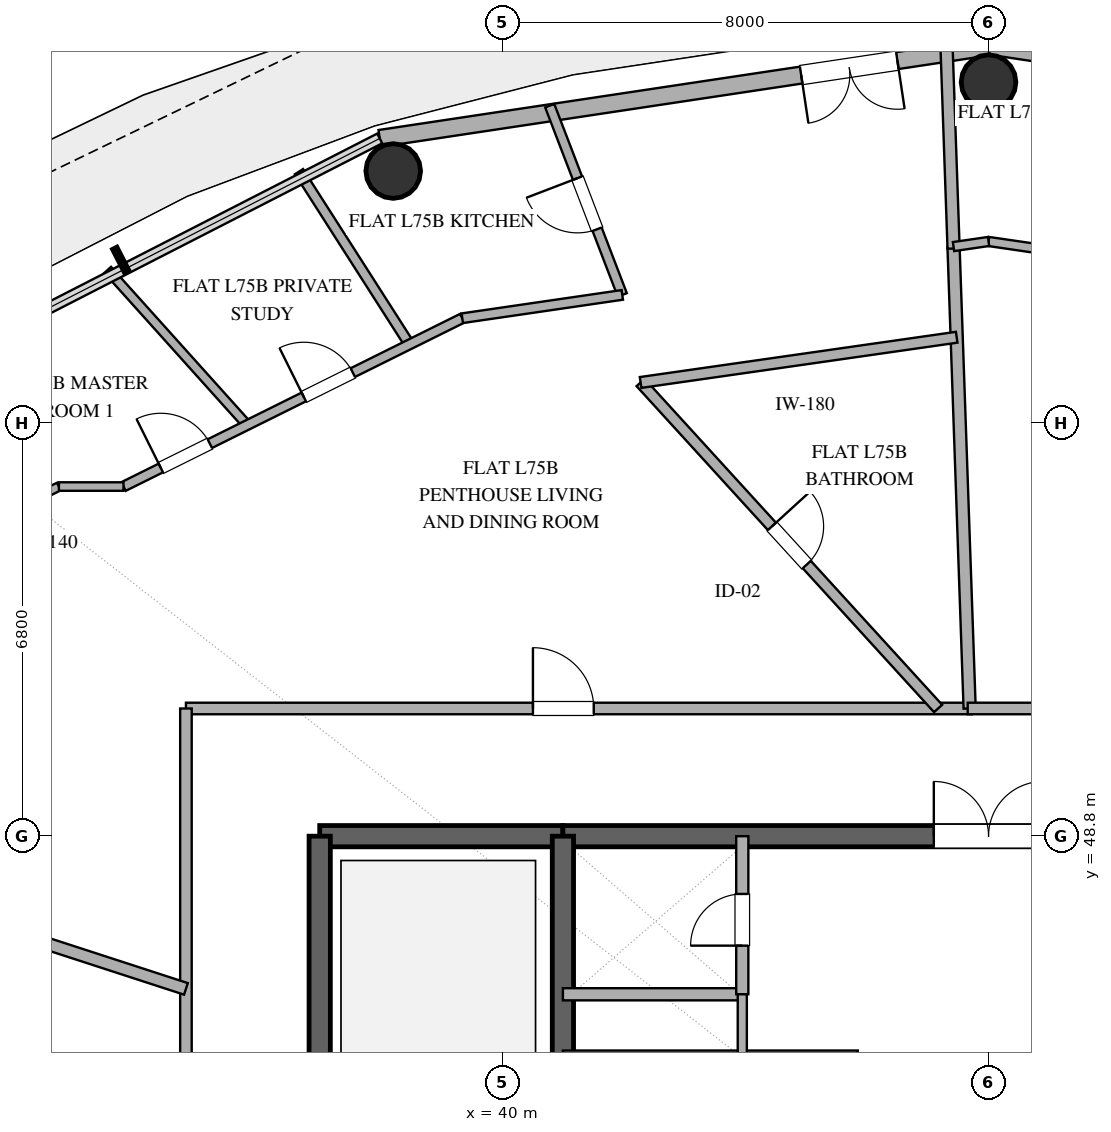
"""IFC4 building model, lengths in metres.
Left out: names, types, materials, properties, quantities, classifications, styles, units other than length and angle.
Written with IfcOpenShell. Run it as: python <this file> out.ifc"""

import sys

from ifc_helpers import new_model, si_unit, direction, frame, frame_2d, origin, origin_2d, place, context, subcontext, project, spatial, rectangle, hollow_circle, extrude, element, fill, save


model = new_model("IFC4")
c1 = context("Model", 3, precision=1e-05, world=origin(), true_north=direction((0.0, 1.0)))
c2 = subcontext(c1, "Body", "Model", "MODEL_VIEW")
j1 = project(units=[si_unit("LENGTHUNIT", "METRE"), si_unit("PLANEANGLEUNIT", "RADIAN")], contexts=[c1])
p1 = place(None, origin())
s1 = spatial("IfcSite", under=j1, at=p1, CompositionType="ELEMENT")
p2 = place(p1, origin())
s2 = spatial("IfcBuilding", under=s1, at=p2, CompositionType="ELEMENT")
p3 = place(p2, frame((0.0, 0.0, 291.0)))
s3 = spatial("IfcBuildingStorey", under=s2, at=p3, CompositionType="ELEMENT", Elevation=291.0)
p4 = place(p3, frame((37.0, 48.8, 0.0), z_axis=(0.0, 0.0, 1.0), x_axis=(1.0, 0.0, 0.0)))
e1 = element("IfcWall", 1, at=p4, inside=s3, PredefinedType="SHEAR", context=c2, shape_type="SweptSolid", body=[
    extrude(rectangle(XDim=4.0, YDim=0.35, at=frame_2d((2.0, 0.0))), origin(), (0.0, 0.0, 1.0), 3.37),
])
p5 = place(p3, frame((41.0, 48.8, 0.0), z_axis=(0.0, 0.0, 1.0), x_axis=(1.0, 0.0, 0.0)))
e2 = element("IfcWall", 2, at=p5, inside=s3, PredefinedType="SHEAR", context=c2, shape_type="SweptSolid", body=[
    extrude(rectangle(XDim=14.0, YDim=0.35, at=frame_2d((7.0, 0.0))), origin(), (0.0, 0.0, 1.0), 3.37),
])
p6 = place(p5, frame((6.1, 0.0, 0.0)))
e3 = element("IfcOpeningElement", 3, at=p6, cuts=e2, PredefinedType="OPENING", context=c2, shape_type="SweptSolid", body=[
    extrude(rectangle(XDim=1.8, YDim=2.25, at=frame_2d((0.9, 1.125))), frame((0.0, 0.185, 0.0), z_axis=(0.0, -1.0, 0.0), x_axis=(1.0, 0.0, 0.0)), (0.0, 0.0, 1.0), 0.37),
])
p7 = place(p3, frame((37.0, 35.2, 0.0), z_axis=(0.0, 0.0, 1.0), x_axis=(0.0, 1.0, 0.0)))
e4 = element("IfcWall", 4, at=p7, inside=s3, PredefinedType="SHEAR", context=c2, shape_type="SweptSolid", body=[
    extrude(rectangle(XDim=13.6, YDim=0.35, at=frame_2d((6.8, 0.0))), origin(), (0.0, 0.0, 1.0), 3.37),
])
p8 = place(p7, frame((1.5, 0.0, 0.0)))
e5 = element("IfcOpeningElement", 5, at=p8, cuts=e4, PredefinedType="OPENING", context=c2, shape_type="SweptSolid", body=[
    extrude(rectangle(XDim=1.2, YDim=2.15, at=frame_2d((0.6, 1.075))), frame((0.0, 0.185, 0.0), z_axis=(0.0, -1.0, 0.0), x_axis=(1.0, 0.0, 0.0)), (0.0, 0.0, 1.0), 0.37),
])
p9 = place(p3, frame((41.0, 35.2, 0.0), z_axis=(0.0, 0.0, 1.0), x_axis=(0.0, 1.0, 0.0)))
e6 = element("IfcWall", 6, at=p9, inside=s3, PredefinedType="SHEAR", context=c2, shape_type="SweptSolid", body=[
    extrude(rectangle(XDim=13.6, YDim=0.35, at=frame_2d((6.8, 0.0))), origin(), (0.0, 0.0, 1.0), 3.37),
])
p10 = place(p9, frame((1.15, 0.0, 0.0)))
e7 = element("IfcOpeningElement", 7, at=p10, cuts=e6, PredefinedType="OPENING", context=c2, shape_type="SweptSolid", body=[
    extrude(rectangle(XDim=1.1, YDim=2.2, at=frame_2d((0.55, 1.1))), frame((0.0, 0.185, 0.0), z_axis=(0.0, -1.0, 0.0), x_axis=(1.0, 0.0, 0.0)), (0.0, 0.0, 1.0), 0.37),
])
for number, where, z_axis, x_axis in (
    (8, (48.0, 61.2, 0.0), (0.0, 0.0, 1.0), (1.0, 0.0, 0.0)),
    (9, (38.209, 59.739, 0.0), (0.0, 0.0, 1.0), (1.0, 0.0, 0.0)),
):
    element("IfcColumn", number, at=place(p3, frame(where, z_axis=z_axis, x_axis=x_axis)), inside=s3, PredefinedType="COLUMN", context=c2, shape_type="SweptSolid", body=[
        extrude(hollow_circle(Radius=0.45, WallThickness=0.025, at=origin_2d()), origin(), (0.0, 0.0, 1.0), 3.37),
    ])
p11 = place(p3, frame((58.013, 60.274, 0.0), z_axis=(0.0, 0.0, 1.0), x_axis=(-0.988882522213, 0.148698881169, 0.0)))
e10 = element("IfcWall", 10, at=p11, inside=s3, PredefinedType="SOLIDWALL", context=c2, shape_type="SweptSolid", body=[
    extrude(rectangle(XDim=10.125, YDim=0.25, at=frame_2d((5.062, 0.0))), origin(), (0.0, 0.0, 1.0), 3.37),
])
p12 = place(p11, frame((2.134, 0.0, 0.35)))
e11 = element("IfcOpeningElement", 11, at=p12, cuts=e10, PredefinedType="OPENING", context=c2, shape_type="SweptSolid", body=[
    extrude(rectangle(XDim=1.0, YDim=1.05, at=frame_2d((0.5, 0.525))), frame((0.0, 0.135, 0.0), z_axis=(0.0, -1.0, 0.0), x_axis=(1.0, 0.0, 0.0)), (0.0, 0.0, 1.0), 0.27),
])
p13 = place(p11, frame((6.582, 0.0, 1.42)))
e12 = element("IfcOpeningElement", 12, at=p13, cuts=e10, PredefinedType="OPENING", context=c2, shape_type="SweptSolid", body=[
    extrude(rectangle(XDim=1.0, YDim=1.05, at=frame_2d((0.5, 0.525))), frame((0.0, 0.135, 0.0), z_axis=(0.0, -1.0, 0.0), x_axis=(1.0, 0.0, 0.0)), (0.0, 0.0, 1.0), 0.27),
])
p14 = place(p3, frame((48.0, 61.78, 0.0), z_axis=(0.0, 0.0, 1.0), x_axis=(-0.988882522213, -0.148698881169, 0.0)))
e13 = element("IfcWall", 13, at=p14, inside=s3, PredefinedType="SOLIDWALL", context=c2, shape_type="SweptSolid", body=[
    extrude(rectangle(XDim=10.125, YDim=0.28, at=frame_2d((5.062, 0.0))), origin(), (0.0, 0.0, 1.0), 3.37),
])
p15 = place(p14, frame((1.516, 0.0, 0.0)))
e14 = element("IfcOpeningElement", 14, at=p15, cuts=e13, PredefinedType="OPENING", context=c2, shape_type="SweptSolid", body=[
    extrude(rectangle(XDim=1.6, YDim=2.25, at=frame_2d((0.8, 1.125))), frame((0.0, 0.15, 0.0), z_axis=(0.0, -1.0, 0.0), x_axis=(1.0, 0.0, 0.0)), (0.0, 0.0, 1.0), 0.3),
])
p16 = place(p3, frame((41.0, 46.2, 0.0), z_axis=(0.0, 0.0, 1.0), x_axis=(1.0, 0.0, 0.0)))
e15 = element("IfcWall", 15, at=p16, inside=s3, PredefinedType="SOLIDWALL", context=c2, shape_type="SweptSolid", body=[
    extrude(rectangle(XDim=2.95, YDim=0.2, at=frame_2d((1.475, 0.0))), origin(), (0.0, 0.0, 1.0), 2.73),
])
p17 = place(p3, frame((43.95, 46.2, 0.0), z_axis=(0.0, 0.0, 1.0), x_axis=(0.0, 1.0, 0.0)))
e16 = element("IfcWall", 16, at=p17, inside=s3, PredefinedType="SOLIDWALL", context=c2, shape_type="SweptSolid", body=[
    extrude(rectangle(XDim=2.6, YDim=0.2, at=frame_2d((1.3, 0.0))), origin(), (0.0, 0.0, 1.0), 2.73),
])
p18 = place(p17, frame((0.8, 0.0, 0.0)))
e17 = element("IfcOpeningElement", 17, at=p18, cuts=e16, PredefinedType="OPENING", context=c2, shape_type="SweptSolid", body=[
    extrude(rectangle(XDim=0.85, YDim=2.15, at=frame_2d((0.425, 1.075))), frame((0.0, 0.11, 0.0), z_axis=(0.0, -1.0, 0.0), x_axis=(1.0, 0.0, 0.0)), (0.0, 0.0, 1.0), 0.22),
])
p19 = place(p3, frame((41.0, 45.2, 0.0), z_axis=(0.0, 0.0, 1.0), x_axis=(1.0, 0.0, 0.0)))
e18 = element("IfcWall", 18, at=p19, inside=s3, PredefinedType="PARTITIONING", context=c2, shape_type="SweptSolid", body=[
    extrude(rectangle(XDim=4.85, YDim=0.15, at=frame_2d((2.425, 0.0))), origin(), (0.0, 0.0, 1.0), 2.73),
])
p20 = place(p3, frame((43.95, 45.2, 0.0), z_axis=(0.0, 0.0, 1.0), x_axis=(0.0, 1.0, 0.0)))
e19 = element("IfcWall", 19, at=p20, inside=s3, PredefinedType="PARTITIONING", context=c2, shape_type="SweptSolid", body=[
    extrude(rectangle(XDim=1.0, YDim=0.15, at=frame_2d((0.5, 0.0))), origin(), (0.0, 0.0, 1.0), 2.73),
])
p21 = place(p3, frame((34.8, 50.9, 0.0), z_axis=(0.0, 0.0, 1.0), x_axis=(1.0, 0.0, 0.0)))
e20 = element("IfcWall", 20, at=p21, inside=s3, PredefinedType="PARTITIONING", context=c2, shape_type="SweptSolid", body=[
    extrude(rectangle(XDim=12.921, YDim=0.19, at=frame_2d((6.46, 0.0))), origin(), (0.0, 0.0, 1.0), 2.73),
])
p22 = place(p21, frame((5.707, 0.0, 0.0)))
e21 = element("IfcOpeningElement", 21, at=p22, cuts=e20, PredefinedType="OPENING", context=c2, shape_type="SweptSolid", body=[
    extrude(rectangle(XDim=1.0, YDim=2.2, at=frame_2d((0.5, 1.1))), frame((0.0, 0.105, 0.0), z_axis=(0.0, -1.0, 0.0), x_axis=(1.0, 0.0, 0.0)), (0.0, 0.0, 1.0), 0.21),
])
p23 = place(p3, frame((34.8, 34.0, 0.0), z_axis=(0.0, 0.0, 1.0), x_axis=(0.0, 1.0, 0.0)))
e22 = element("IfcWall", 22, at=p23, inside=s3, PredefinedType="PARTITIONING", context=c2, shape_type="SweptSolid", body=[
    extrude(rectangle(XDim=16.9, YDim=0.19, at=frame_2d((8.45, 0.0))), origin(), (0.0, 0.0, 1.0), 2.73),
])
p24 = place(p23, frame((7.627, 0.0, 0.0)))
e23 = element("IfcOpeningElement", 23, at=p24, cuts=e22, PredefinedType="OPENING", context=c2, shape_type="SweptSolid", body=[
    extrude(rectangle(XDim=1.0, YDim=2.2, at=frame_2d((0.5, 1.1))), frame((0.0, 0.105, 0.0), z_axis=(0.0, -1.0, 0.0), x_axis=(1.0, 0.0, 0.0)), (0.0, 0.0, 1.0), 0.21),
])
p25 = place(p3, frame((24.276, 49.708, 0.0), z_axis=(0.0, 0.0, 1.0), x_axis=(0.951054334328, -0.309023709699, 0.0)))
e24 = element("IfcWall", 24, at=p25, inside=s3, PredefinedType="PARTITIONING", context=c2, shape_type="SweptSolid", body=[
    extrude(rectangle(XDim=11.065, YDim=0.2, at=frame_2d((5.533, 0.0))), origin(), (0.0, 0.0, 1.0), 2.73),
])
p26 = place(p3, frame((42.278, 56.261, 0.0), z_axis=(0.0, 0.0, 1.0), x_axis=(0.674096276867, -0.73864349284, 0.0)))
e25 = element("IfcWall", 25, at=p26, inside=s3, PredefinedType="PLUMBINGWALL", context=c2, shape_type="SweptSolid", body=[
    extrude(rectangle(XDim=7.258, YDim=0.18, at=frame_2d((3.629, 0.0))), origin(), (0.0, 0.0, 1.0), 2.73),
])
p27 = place(p26, frame((3.204, 0.0, 0.0)))
e26 = element("IfcOpeningElement", 26, at=p27, cuts=e25, PredefinedType="OPENING", context=c2, shape_type="SweptSolid", body=[
    extrude(rectangle(XDim=0.85, YDim=2.1, at=frame_2d((0.425, 1.05))), frame((0.0, 0.1, 0.0), z_axis=(0.0, -1.0, 0.0), x_axis=(1.0, 0.0, 0.0)), (0.0, 0.0, 1.0), 0.2),
])
p28 = place(p3, frame((47.689, 50.9, 0.0), z_axis=(0.0, 0.0, 1.0), x_axis=(-0.034882659784, 0.999391414835, 0.0)))
e27 = element("IfcWall", 27, at=p28, inside=s3, PredefinedType="PARTITIONING", context=c2, shape_type="SweptSolid", body=[
    extrude(rectangle(XDim=7.601, YDim=0.2, at=frame_2d((3.8, 0.0))), origin(), (0.0, 0.0, 1.0), 2.73),
])
p29 = place(p3, frame((47.476, 57.005, 0.0), z_axis=(0.0, 0.0, 1.0), x_axis=(-0.989922511169, -0.141610105153, 0.0)))
e28 = element("IfcWall", 28, at=p29, inside=s3, PredefinedType="PLUMBINGWALL", context=c2, shape_type="SweptSolid", body=[
    extrude(rectangle(XDim=5.251, YDim=0.18, at=frame_2d((2.626, 0.0))), origin(), (0.0, 0.0, 1.0), 2.73),
])
p30 = place(p3, frame((48.0, 58.58, 0.0), z_axis=(0.0, 0.0, 1.0), x_axis=(0.989536136377, -0.144285254977, 0.0)))
e29 = element("IfcWall", 29, at=p30, inside=s3, PredefinedType="PARTITIONING", context=c2, shape_type="SweptSolid", body=[
    extrude(rectangle(XDim=8.746, YDim=0.15, at=frame_2d((4.373, 0.0))), origin(), (0.0, 0.0, 1.0), 2.73),
])
p31 = place(p30, frame((1.479, 0.0, 0.0)))
e30 = element("IfcOpeningElement", 30, at=p31, cuts=e29, PredefinedType="OPENING", context=c2, shape_type="SweptSolid", body=[
    extrude(rectangle(XDim=0.9, YDim=2.1, at=frame_2d((0.45, 1.05))), frame((0.0, 0.085, 0.0), z_axis=(0.0, -1.0, 0.0), x_axis=(1.0, 0.0, 0.0)), (0.0, 0.0, 1.0), 0.17),
])
p32 = place(p30, frame((5.193, 0.0, 0.0)))
e31 = element("IfcOpeningElement", 31, at=p32, cuts=e29, PredefinedType="OPENING", context=c2, shape_type="SweptSolid", body=[
    extrude(rectangle(XDim=0.9, YDim=2.1, at=frame_2d((0.45, 1.05))), frame((0.0, 0.085, 0.0), z_axis=(0.0, -1.0, 0.0), x_axis=(1.0, 0.0, 0.0)), (0.0, 0.0, 1.0), 0.17),
])
p33 = place(p3, frame((35.807, 55.561, 0.0), z_axis=(0.0, 0.0, 1.0), x_axis=(-0.668618761853, 0.743605373365, 0.0)))
e32 = element("IfcWall", 32, at=p33, inside=s3, PredefinedType="PARTITIONING", context=c2, shape_type="SweptSolid", body=[
    extrude(rectangle(XDim=3.432, YDim=0.15, at=frame_2d((1.716, 0.0))), origin(), (0.0, 0.0, 1.0), 2.73),
])
p34 = place(p3, frame((38.477, 56.887, 0.0), z_axis=(0.0, 0.0, 1.0), x_axis=(-0.538850350107, 0.842401507709, 0.0)))
e33 = element("IfcWall", 33, at=p34, inside=s3, PredefinedType="PLUMBINGWALL", context=c2, shape_type="SweptSolid", body=[
    extrude(rectangle(XDim=3.373, YDim=0.16, at=frame_2d((1.687, 0.0))), origin(), (0.0, 0.0, 1.0), 2.73),
])
p35 = place(p3, frame((47.309, 61.797, 0.0), z_axis=(0.0, 0.0, 1.0), x_axis=(0.034921182562, -0.999390069497, 0.0)))
e34 = element("IfcWall", 34, at=p35, inside=s3, PredefinedType="PARTITIONING", context=c2, shape_type="SweptSolid", body=[
    extrude(rectangle(XDim=3.335, YDim=0.2, at=frame_2d((1.667, 0.0))), origin(), (0.0, 0.0, 1.0), 2.73),
])
p36 = place(p3, frame((41.977, 57.702, 0.0), z_axis=(0.0, 0.0, 1.0), x_axis=(-0.358154229758, 0.933662437772, 0.0)))
e35 = element("IfcWall", 35, at=p36, inside=s3, PredefinedType="PLUMBINGWALL", context=c2, shape_type="SweptSolid", body=[
    extrude(rectangle(XDim=3.333, YDim=0.16, at=frame_2d((1.667, 0.0))), origin(), (0.0, 0.0, 1.0), 2.73),
])
p37 = place(p36, frame((1.156, 0.0, 0.0)))
e36 = element("IfcOpeningElement", 36, at=p37, cuts=e35, PredefinedType="OPENING", context=c2, shape_type="SweptSolid", body=[
    extrude(rectangle(XDim=0.9, YDim=2.1, at=frame_2d((0.45, 1.05))), frame((0.0, 0.09, 0.0), z_axis=(0.0, -1.0, 0.0), x_axis=(1.0, 0.0, 0.0)), (0.0, 0.0, 1.0), 0.18),
])
p38 = place(p3, frame((33.773, 54.55, 0.0), z_axis=(0.0, 0.0, 1.0), x_axis=(0.895562239868, 0.444936258943, 0.0)))
e37 = element("IfcWall", 37, at=p38, inside=s3, PredefinedType="PLUMBINGWALL", context=c2, shape_type="SweptSolid", body=[
    extrude(rectangle(XDim=6.222, YDim=0.16, at=frame_2d((3.111, 0.0))), origin(), (0.0, 0.0, 1.0), 2.73),
])
p39 = place(p38, frame((3.311, 0.0, 0.0)))
e38 = element("IfcOpeningElement", 38, at=p39, cuts=e37, PredefinedType="OPENING", context=c2, shape_type="SweptSolid", body=[
    extrude(rectangle(XDim=0.9, YDim=2.1, at=frame_2d((0.45, 1.05))), frame((0.0, 0.09, 0.0), z_axis=(0.0, -1.0, 0.0), x_axis=(1.0, 0.0, 0.0)), (0.0, 0.0, 1.0), 0.18),
])
p40 = place(p38, frame((0.686, 0.0, 0.0)))
e39 = element("IfcOpeningElement", 39, at=p40, cuts=e37, PredefinedType="OPENING", context=c2, shape_type="SweptSolid", body=[
    extrude(rectangle(XDim=0.9, YDim=2.1, at=frame_2d((0.45, 1.05))), frame((0.0, 0.09, 0.0), z_axis=(0.0, -1.0, 0.0), x_axis=(1.0, 0.0, 0.0)), (0.0, 0.0, 1.0), 0.18),
])
p41 = place(p3, frame((47.657, 50.9, 0.0), z_axis=(0.0, 0.0, 1.0), x_axis=(1.0, 0.0, 0.0)))
e40 = element("IfcWall", 40, at=p41, inside=s3, PredefinedType="PARTITIONING", context=c2, shape_type="SweptSolid", body=[
    extrude(rectangle(XDim=2.939, YDim=0.19, at=frame_2d((1.469, 0.0))), origin(), (0.0, 0.0, 1.0), 2.73),
])
p42 = place(p3, frame((39.345, 57.318, 0.0), z_axis=(0.0, 0.0, 1.0), x_axis=(0.989530249601, 0.144325621857, 0.0)))
e41 = element("IfcWall", 41, at=p42, inside=s3, PredefinedType="PLUMBINGWALL", context=c2, shape_type="SweptSolid", body=[
    extrude(rectangle(XDim=2.659, YDim=0.16, at=frame_2d((1.33, 0.0))), origin(), (0.0, 0.0, 1.0), 2.73),
])
p43 = place(p3, frame((32.711, 54.55, 0.0), z_axis=(0.0, 0.0, 1.0), x_axis=(-0.895409226325, -0.445244109912, 0.0)))
e42 = element("IfcWall", 42, at=p43, inside=s3, PredefinedType="PARTITIONING", context=c2, shape_type="SweptSolid", body=[
    extrude(rectangle(XDim=1.141, YDim=0.14, at=frame_2d((0.571, 0.0))), origin(), (0.0, 0.0, 1.0), 2.73),
])
p44 = place(p3, frame((33.773, 54.55, 0.0), z_axis=(0.0, 0.0, 1.0), x_axis=(-1.0, 0.0, 0.0)))
e43 = element("IfcWall", 43, at=p44, inside=s3, PredefinedType="PARTITIONING", context=c2, shape_type="SweptSolid", body=[
    extrude(rectangle(XDim=1.062, YDim=0.14, at=frame_2d((0.531, 0.0))), origin(), (0.0, 0.0, 1.0), 2.73),
])
p45 = place(p3, frame((47.424, 58.496, 0.0), z_axis=(0.0, 0.0, 1.0), x_axis=(0.989534228924, 0.144298336053, 0.0)))
e44 = element("IfcWall", 44, at=p45, inside=s3, PredefinedType="PARTITIONING", context=c2, shape_type="SweptSolid", body=[
    extrude(rectangle(XDim=0.582, YDim=0.15, at=frame_2d((0.291, 0.0))), origin(), (0.0, 0.0, 1.0), 2.73),
])
p46 = place(p15, origin())
e45 = element("IfcDoor", 45, at=p46, inside=s3, OperationType="DOUBLE_DOOR_SINGLE_SWING", PredefinedType="DOOR", context=c2, shape_type="SweptSolid", body=[
    extrude(rectangle(XDim=1.6, YDim=2.25, at=frame_2d((0.8, 1.125))), frame((0.0, 0.025, 0.0), z_axis=(0.0, -1.0, 0.0), x_axis=(1.0, 0.0, 0.0)), (0.0, 0.0, 1.0), 0.05),
])
fill(e14, e45)
p47 = place(p6, origin())
e46 = element("IfcDoor", 46, at=p47, inside=s3, OperationType="DOUBLE_DOOR_SINGLE_SWING", PredefinedType="DOOR", context=c2, shape_type="SweptSolid", body=[
    extrude(rectangle(XDim=1.8, YDim=2.25, at=frame_2d((0.9, 1.125))), frame((0.0, 0.025, 0.0), z_axis=(0.0, -1.0, 0.0), x_axis=(1.0, 0.0, 0.0)), (0.0, 0.0, 1.0), 0.05),
])
fill(e3, e46)
p48 = place(p18, origin())
e47 = element("IfcDoor", 47, at=p48, inside=s3, OperationType="SINGLE_SWING_LEFT", PredefinedType="DOOR", context=c2, shape_type="SweptSolid", body=[
    extrude(rectangle(XDim=0.85, YDim=2.15, at=frame_2d((0.425, 1.075))), frame((0.0, 0.025, 0.0), z_axis=(0.0, -1.0, 0.0), x_axis=(1.0, 0.0, 0.0)), (0.0, 0.0, 1.0), 0.05),
])
fill(e17, e47)
p49 = place(p22, origin())
e48 = element("IfcDoor", 48, at=p49, inside=s3, OperationType="SINGLE_SWING_LEFT", PredefinedType="DOOR", context=c2, shape_type="SweptSolid", body=[
    extrude(rectangle(XDim=1.0, YDim=2.2, at=frame_2d((0.5, 1.1))), frame((0.0, 0.025, 0.0), z_axis=(0.0, -1.0, 0.0), x_axis=(1.0, 0.0, 0.0)), (0.0, 0.0, 1.0), 0.05),
])
fill(e21, e48)
p50 = place(p27, origin())
e49 = element("IfcDoor", 49, at=p50, inside=s3, OperationType="SINGLE_SWING_LEFT", PredefinedType="DOOR", context=c2, shape_type="SweptSolid", body=[
    extrude(rectangle(XDim=0.85, YDim=2.1, at=frame_2d((0.425, 1.05))), frame((0.0, 0.025, 0.0), z_axis=(0.0, -1.0, 0.0), x_axis=(1.0, 0.0, 0.0)), (0.0, 0.0, 1.0), 0.05),
])
fill(e26, e49)
p51 = place(p37, origin())
e50 = element("IfcDoor", 50, at=p51, inside=s3, OperationType="SINGLE_SWING_RIGHT", PredefinedType="DOOR", context=c2, shape_type="SweptSolid", body=[
    extrude(rectangle(XDim=0.9, YDim=2.1, at=frame_2d((0.45, 1.05))), frame((0.0, 0.025, 0.0), z_axis=(0.0, -1.0, 0.0), x_axis=(1.0, 0.0, 0.0)), (0.0, 0.0, 1.0), 0.05),
])
fill(e36, e50)
p52 = place(p39, origin())
e51 = element("IfcDoor", 51, at=p52, inside=s3, OperationType="SINGLE_SWING_LEFT", PredefinedType="DOOR", context=c2, shape_type="SweptSolid", body=[
    extrude(rectangle(XDim=0.9, YDim=2.1, at=frame_2d((0.45, 1.05))), frame((0.0, 0.025, 0.0), z_axis=(0.0, -1.0, 0.0), x_axis=(1.0, 0.0, 0.0)), (0.0, 0.0, 1.0), 0.05),
])
fill(e38, e51)
p53 = place(p40, origin())
e52 = element("IfcDoor", 52, at=p53, inside=s3, OperationType="SINGLE_SWING_LEFT", PredefinedType="DOOR", context=c2, shape_type="SweptSolid", body=[
    extrude(rectangle(XDim=0.9, YDim=2.1, at=frame_2d((0.45, 1.05))), frame((0.0, 0.025, 0.0), z_axis=(0.0, -1.0, 0.0), x_axis=(1.0, 0.0, 0.0)), (0.0, 0.0, 1.0), 0.05),
])
fill(e39, e52)
save(model, sys.argv[1])
